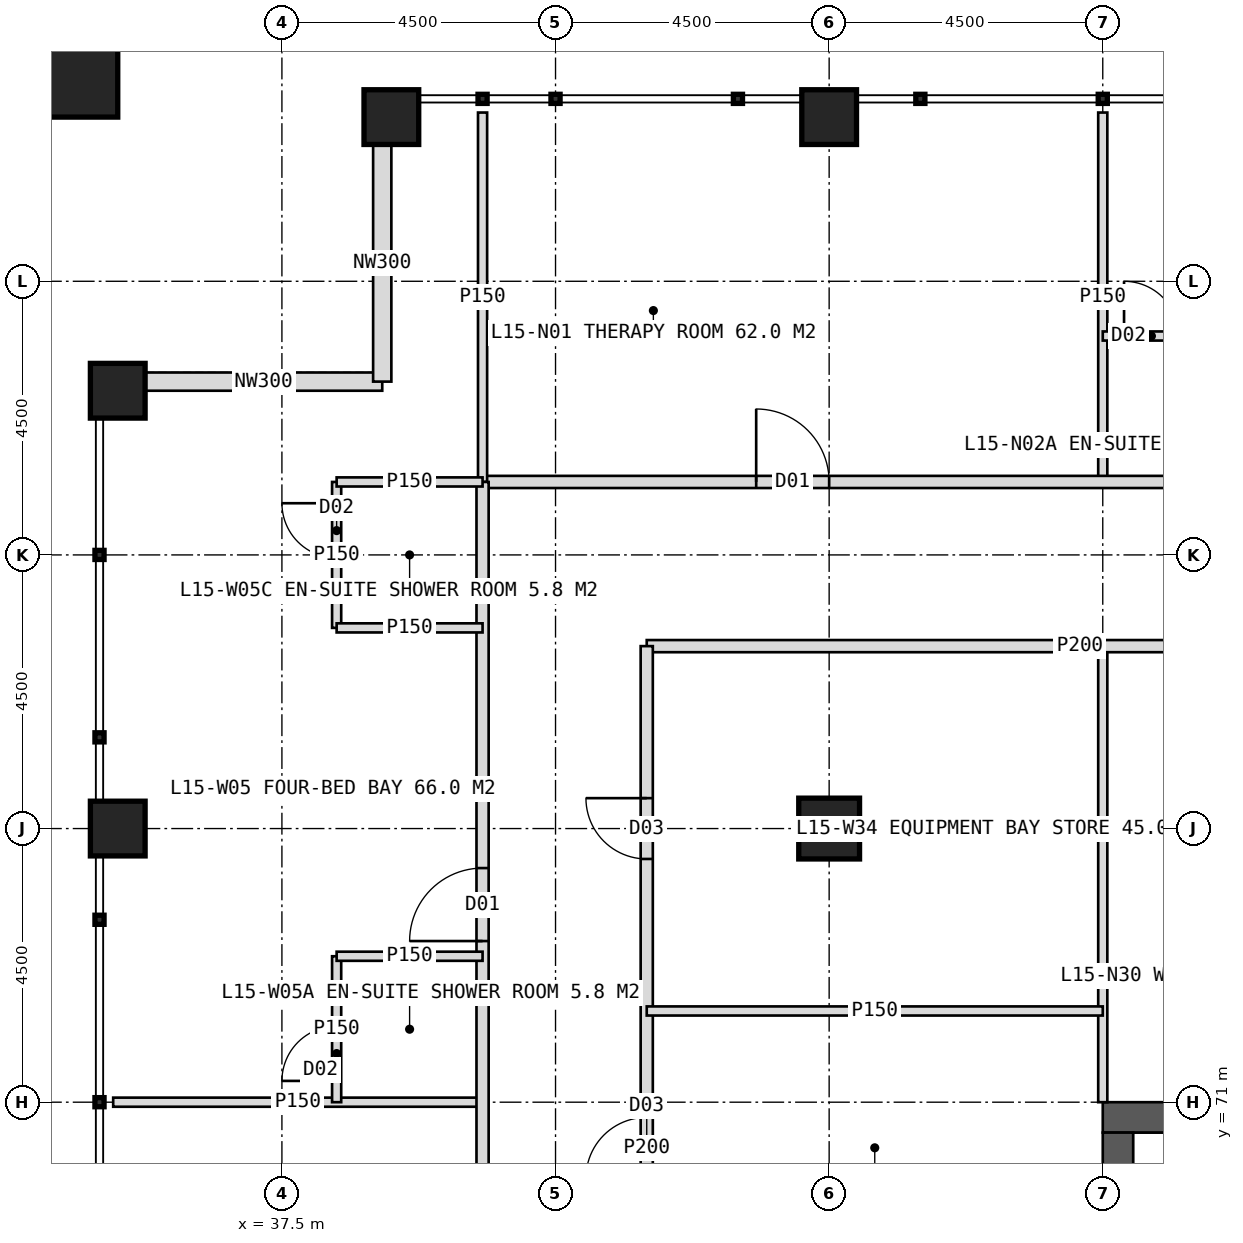
"""IFC4 building model, lengths in metres.
Left out: names, types, materials, properties, quantities, classifications, styles, units other than length and angle.
Written with IfcOpenShell. Run it as: python <this file> out.ifc"""

import sys

from ifc_helpers import new_model, si_unit, direction, frame, frame_2d, origin, origin_2d, place, context, subcontext, project, spatial, rectangle, hollow_rectangle, extrude, element, fill, save


model = new_model("IFC4")
c1 = context("Model", 3, precision=1e-05, world=origin(), true_north=direction((0.0, 1.0)))
c2 = subcontext(c1, "Body", "Model", "MODEL_VIEW")
j1 = project(units=[si_unit("LENGTHUNIT", "METRE"), si_unit("PLANEANGLEUNIT", "RADIAN")], contexts=[c1])
p1 = place(None, origin())
s1 = spatial("IfcSite", under=j1, at=p1, CompositionType="ELEMENT")
p2 = place(p1, origin())
s2 = spatial("IfcBuilding", under=s1, at=p2, CompositionType="ELEMENT")
p3 = place(p2, frame((0.0, 0.0, 67.0)))
s3 = spatial("IfcBuildingStorey", under=s2, at=p3, CompositionType="ELEMENT", Elevation=67.0)
p4 = place(p3, frame((51.0, 70.75, 0.0), z_axis=(0.0, 0.0, 1.0), x_axis=(1.0, 0.0, 0.0)))
e1 = element("IfcWall", 1, at=p4, inside=s3, PredefinedType="SHEAR", context=c2, shape_type="SweptSolid", body=[
    extrude(rectangle(XDim=18.0, YDim=0.5, at=frame_2d((9.0, 0.0))), origin(), (0.0, 0.0, 1.0), 4.0),
])
p5 = place(p4, frame((8.1, 0.0, 0.0)))
e2 = element("IfcOpeningElement", 2, at=p5, cuts=e1, PredefinedType="OPENING", context=c2, shape_type="SweptSolid", body=[
    extrude(rectangle(XDim=1.8, YDim=2.2, at=frame_2d((0.9, 1.1))), frame((0.0, 0.26, 0.0), z_axis=(0.0, -1.0, 0.0), x_axis=(1.0, 0.0, 0.0)), (0.0, 0.0, 1.0), 0.52),
])
p6 = place(p3, frame((51.25, 53.5, 0.0), z_axis=(0.0, 0.0, 1.0), x_axis=(0.0, 1.0, 0.0)))
e3 = element("IfcWall", 3, at=p6, inside=s3, PredefinedType="SHEAR", context=c2, shape_type="SweptSolid", body=[
    extrude(rectangle(XDim=17.0, YDim=0.5, at=frame_2d((8.5, 0.0))), origin(), (0.0, 0.0, 1.0), 4.0),
])
p7 = place(p6, frame((6.0, 0.0, 0.0)))
e4 = element("IfcOpeningElement", 4, at=p7, cuts=e3, PredefinedType="OPENING", context=c2, shape_type="SweptSolid", body=[
    extrude(rectangle(XDim=1.5, YDim=2.2, at=frame_2d((0.75, 1.1))), frame((0.0, 0.26, 0.0), z_axis=(0.0, -1.0, 0.0), x_axis=(1.0, 0.0, 0.0)), (0.0, 0.0, 1.0), 0.52),
])
p8 = place(p3, frame((46.5, 75.5, 0.0), z_axis=(0.0, 0.0, 1.0), x_axis=(1.0, 0.0, 0.0)))
e5 = element("IfcColumn", 5, at=p8, inside=s3, PredefinedType="COLUMN", context=c2, shape_type="SweptSolid", body=[
    extrude(hollow_rectangle(XDim=1.0, YDim=1.0, WallThickness=0.1, at=origin_2d()), origin(), (0.0, 0.0, 1.0), 4.0),
])
for number, where, z_axis, x_axis in (
    (6, (39.3, 87.2, 0.0), (0.0, 0.0, 1.0), (1.0, 0.0, 0.0)),
    (7, (46.5, 87.2, 0.0), (0.0, 0.0, 1.0), (1.0, 0.0, 0.0)),
    (8, (34.8, 75.5, 0.0), (0.0, 0.0, 1.0), (1.0, 0.0, 0.0)),
    (9, (34.8, 82.7, 0.0), (0.0, 0.0, 1.0), (1.0, 0.0, 0.0)),
):
    element("IfcColumn", number, at=place(p3, frame(where, z_axis=z_axis, x_axis=x_axis)), inside=s3, PredefinedType="COLUMN", context=c2, shape_type="SweptSolid", body=[
        extrude(hollow_rectangle(XDim=0.9, YDim=0.9, WallThickness=0.08, at=origin_2d()), origin(), (0.0, 0.0, 1.0), 4.0),
    ])
p9 = place(p3, frame((33.9, 88.1, 0.0), z_axis=(0.0, 0.0, 1.0), x_axis=(1.0, 0.0, 0.0)))
e10 = element("IfcColumn", 10, at=p9, inside=s3, PredefinedType="COLUMN", context=c2, shape_type="SweptSolid", body=[
    extrude(hollow_rectangle(XDim=1.8, YDim=1.8, WallThickness=0.1, at=origin_2d()), origin(), (0.0, 0.0, 1.0), 4.0),
])
for number, where, z_axis, x_axis in (
    (11, (35.25, 82.85, 0.0), (0.0, 0.0, 1.0), (1.0, 0.0, 0.0)),
    (12, (39.15, 82.85, 0.0), (0.0, 0.0, 1.0), (0.0, 1.0, 0.0)),
):
    element("IfcWall", number, at=place(p3, frame(where, z_axis=z_axis, x_axis=x_axis)), inside=s3, PredefinedType="ELEMENTEDWALL", context=c2, shape_type="SweptSolid", body=[
        extrude(rectangle(XDim=3.9, YDim=0.3, at=frame_2d((1.95, 0.0))), origin(), (0.0, 0.0, 1.0), 2.95),
    ])
p10 = place(p3, frame((51.0, 81.2, 0.0), z_axis=(0.0, 0.0, 1.0), x_axis=(0.0, 1.0, 0.0)))
e13 = element("IfcWall", 13, at=p10, inside=s3, PredefinedType="PARTITIONING", context=c2, shape_type="SweptSolid", body=[
    extrude(rectangle(XDim=6.075, YDim=0.15, at=frame_2d((3.038, 0.0))), origin(), (0.0, 0.0, 1.0), 3.75),
])
p11 = place(p3, frame((40.8, 81.2, 0.0), z_axis=(0.0, 0.0, 1.0), x_axis=(1.0, 0.0, 0.0)))
e14 = element("IfcWall", 14, at=p11, inside=s3, PredefinedType="PARTITIONING", context=c2, shape_type="SweptSolid", body=[
    extrude(rectangle(XDim=38.4, YDim=0.2, at=frame_2d((19.2, 0.0))), origin(), (0.0, 0.0, 1.0), 3.75),
])
p12 = place(p11, frame((4.5, 0.0, 0.0)))
e15 = element("IfcOpeningElement", 15, at=p12, cuts=e14, PredefinedType="OPENING", context=c2, shape_type="SweptSolid", body=[
    extrude(rectangle(XDim=1.2, YDim=2.2, at=frame_2d((0.6, 1.1))), frame((0.0, 0.11, 0.0), z_axis=(0.0, -1.0, 0.0), x_axis=(1.0, 0.0, 0.0)), (0.0, 0.0, 1.0), 0.22),
])
p13 = place(p11, frame((13.45, 0.0, 0.0)))
e16 = element("IfcOpeningElement", 16, at=p13, cuts=e14, PredefinedType="OPENING", context=c2, shape_type="SweptSolid", body=[
    extrude(rectangle(XDim=1.2, YDim=2.2, at=frame_2d((0.6, 1.1))), frame((0.0, 0.11, 0.0), z_axis=(0.0, -1.0, 0.0), x_axis=(1.0, 0.0, 0.0)), (0.0, 0.0, 1.0), 0.22),
])
p14 = place(p11, frame((22.45, 0.0, 0.0)))
e17 = element("IfcOpeningElement", 17, at=p14, cuts=e14, PredefinedType="OPENING", context=c2, shape_type="SweptSolid", body=[
    extrude(rectangle(XDim=1.2, YDim=2.2, at=frame_2d((0.6, 1.1))), frame((0.0, 0.11, 0.0), z_axis=(0.0, -1.0, 0.0), x_axis=(1.0, 0.0, 0.0)), (0.0, 0.0, 1.0), 0.22),
])
p15 = place(p11, frame((30.85, 0.0, 0.0)))
e18 = element("IfcOpeningElement", 18, at=p15, cuts=e14, PredefinedType="OPENING", context=c2, shape_type="SweptSolid", body=[
    extrude(rectangle(XDim=1.2, YDim=2.2, at=frame_2d((0.6, 1.1))), frame((0.0, 0.11, 0.0), z_axis=(0.0, -1.0, 0.0), x_axis=(1.0, 0.0, 0.0)), (0.0, 0.0, 1.0), 0.22),
])
p16 = place(p3, frame((40.8, 81.2, 0.0), z_axis=(0.0, 0.0, 1.0), x_axis=(0.0, 1.0, 0.0)))
e19 = element("IfcWall", 19, at=p16, inside=s3, PredefinedType="PARTITIONING", context=c2, shape_type="SweptSolid", body=[
    extrude(rectangle(XDim=6.075, YDim=0.15, at=frame_2d((3.038, 0.0))), origin(), (0.0, 0.0, 1.0), 3.75),
])
p17 = place(p3, frame((51.0, 83.6, 0.0), z_axis=(0.0, 0.0, 1.0), x_axis=(1.0, 0.0, 0.0)))
e20 = element("IfcWall", 20, at=p17, inside=s3, PredefinedType="PARTITIONING", context=c2, shape_type="SweptSolid", body=[
    extrude(rectangle(XDim=3.0, YDim=0.15, at=frame_2d((1.5, 0.0))), origin(), (0.0, 0.0, 1.0), 3.75),
])
p18 = place(p17, frame((0.35, 0.0, 0.0)))
e21 = element("IfcOpeningElement", 21, at=p18, cuts=e20, PredefinedType="OPENING", context=c2, shape_type="SweptSolid", body=[
    extrude(rectangle(XDim=0.9, YDim=2.1, at=frame_2d((0.45, 1.05))), frame((0.0, 0.085, 0.0), z_axis=(0.0, -1.0, 0.0), x_axis=(1.0, 0.0, 0.0)), (0.0, 0.0, 1.0), 0.17),
])
p19 = place(p3, frame((51.0, 71.0, 0.0), z_axis=(0.0, 0.0, 1.0), x_axis=(0.0, 1.0, 0.0)))
e22 = element("IfcWall", 22, at=p19, inside=s3, PredefinedType="PARTITIONING", context=c2, shape_type="SweptSolid", body=[
    extrude(rectangle(XDim=7.5, YDim=0.15, at=frame_2d((3.75, 0.0))), origin(), (0.0, 0.0, 1.0), 3.75),
])
p20 = place(p3, frame((43.5, 78.5, 0.0), z_axis=(0.0, 0.0, 1.0), x_axis=(1.0, 0.0, 0.0)))
e23 = element("IfcWall", 23, at=p20, inside=s3, PredefinedType="PARTITIONING", context=c2, shape_type="SweptSolid", body=[
    extrude(rectangle(XDim=14.25, YDim=0.2, at=frame_2d((7.125, 0.0))), origin(), (0.0, 0.0, 1.0), 3.75),
])
p21 = place(p20, frame((10.375, 0.0, 0.0)))
e24 = element("IfcOpeningElement", 24, at=p21, cuts=e23, PredefinedType="OPENING", context=c2, shape_type="SweptSolid", body=[
    extrude(rectangle(XDim=1.0, YDim=2.1, at=frame_2d((0.5, 1.05))), frame((0.0, 0.11, 0.0), z_axis=(0.0, -1.0, 0.0), x_axis=(1.0, 0.0, 0.0)), (0.0, 0.0, 1.0), 0.22),
])
p22 = place(p3, frame((40.8, 71.0, 0.0), z_axis=(0.0, 0.0, 1.0), x_axis=(-1.0, 0.0, 0.0)))
e25 = element("IfcWall", 25, at=p22, inside=s3, PredefinedType="PARTITIONING", context=c2, shape_type="SweptSolid", body=[
    extrude(rectangle(XDim=6.075, YDim=0.15, at=frame_2d((3.038, 0.0))), origin(), (0.0, 0.0, 1.0), 3.75),
])
p23 = place(p3, frame((40.8, 42.8, 0.0), z_axis=(0.0, 0.0, 1.0), x_axis=(0.0, 1.0, 0.0)))
e26 = element("IfcWall", 26, at=p23, inside=s3, PredefinedType="PARTITIONING", context=c2, shape_type="SweptSolid", body=[
    extrude(rectangle(XDim=38.4, YDim=0.2, at=frame_2d((19.2, 0.0))), origin(), (0.0, 0.0, 1.0), 3.75),
])
p24 = place(p23, frame((3.25, 0.0, 0.0)))
e27 = element("IfcOpeningElement", 27, at=p24, cuts=e26, PredefinedType="OPENING", context=c2, shape_type="SweptSolid", body=[
    extrude(rectangle(XDim=1.2, YDim=2.2, at=frame_2d((0.6, 1.1))), frame((0.0, 0.11, 0.0), z_axis=(0.0, -1.0, 0.0), x_axis=(1.0, 0.0, 0.0)), (0.0, 0.0, 1.0), 0.22),
])
p25 = place(p23, frame((9.85, 0.0, 0.0)))
e28 = element("IfcOpeningElement", 28, at=p25, cuts=e26, PredefinedType="OPENING", context=c2, shape_type="SweptSolid", body=[
    extrude(rectangle(XDim=1.2, YDim=2.2, at=frame_2d((0.6, 1.1))), frame((0.0, 0.11, 0.0), z_axis=(0.0, -1.0, 0.0), x_axis=(1.0, 0.0, 0.0)), (0.0, 0.0, 1.0), 0.22),
])
p26 = place(p23, frame((15.85, 0.0, 0.0)))
e29 = element("IfcOpeningElement", 29, at=p26, cuts=e26, PredefinedType="OPENING", context=c2, shape_type="SweptSolid", body=[
    extrude(rectangle(XDim=1.2, YDim=2.2, at=frame_2d((0.6, 1.1))), frame((0.0, 0.11, 0.0), z_axis=(0.0, -1.0, 0.0), x_axis=(1.0, 0.0, 0.0)), (0.0, 0.0, 1.0), 0.22),
])
p27 = place(p23, frame((22.45, 0.0, 0.0)))
e30 = element("IfcOpeningElement", 30, at=p27, cuts=e26, PredefinedType="OPENING", context=c2, shape_type="SweptSolid", body=[
    extrude(rectangle(XDim=1.2, YDim=2.2, at=frame_2d((0.6, 1.1))), frame((0.0, 0.11, 0.0), z_axis=(0.0, -1.0, 0.0), x_axis=(1.0, 0.0, 0.0)), (0.0, 0.0, 1.0), 0.22),
])
p28 = place(p23, frame((30.85, 0.0, 0.0)))
e31 = element("IfcOpeningElement", 31, at=p28, cuts=e26, PredefinedType="OPENING", context=c2, shape_type="SweptSolid", body=[
    extrude(rectangle(XDim=1.2, YDim=2.2, at=frame_2d((0.6, 1.1))), frame((0.0, 0.11, 0.0), z_axis=(0.0, -1.0, 0.0), x_axis=(1.0, 0.0, 0.0)), (0.0, 0.0, 1.0), 0.22),
])
p29 = place(p3, frame((38.4, 71.0, 0.0), z_axis=(0.0, 0.0, 1.0), x_axis=(0.0, 1.0, 0.0)))
e32 = element("IfcWall", 32, at=p29, inside=s3, PredefinedType="PARTITIONING", context=c2, shape_type="SweptSolid", body=[
    extrude(rectangle(XDim=2.4, YDim=0.15, at=frame_2d((1.2, 0.0))), origin(), (0.0, 0.0, 1.0), 3.75),
])
p30 = place(p29, frame((0.35, 0.0, 0.0)))
e33 = element("IfcOpeningElement", 33, at=p30, cuts=e32, PredefinedType="OPENING", context=c2, shape_type="SweptSolid", body=[
    extrude(rectangle(XDim=0.9, YDim=2.1, at=frame_2d((0.45, 1.05))), frame((0.0, 0.085, 0.0), z_axis=(0.0, -1.0, 0.0), x_axis=(1.0, 0.0, 0.0)), (0.0, 0.0, 1.0), 0.17),
])
p31 = place(p3, frame((40.8, 73.4, 0.0), z_axis=(0.0, 0.0, 1.0), x_axis=(-1.0, 0.0, 0.0)))
e34 = element("IfcWall", 34, at=p31, inside=s3, PredefinedType="PARTITIONING", context=c2, shape_type="SweptSolid", body=[
    extrude(rectangle(XDim=2.4, YDim=0.15, at=frame_2d((1.2, 0.0))), origin(), (0.0, 0.0, 1.0), 3.75),
])
p32 = place(p3, frame((38.4, 78.8, 0.0), z_axis=(0.0, 0.0, 1.0), x_axis=(0.0, 1.0, 0.0)))
e35 = element("IfcWall", 35, at=p32, inside=s3, PredefinedType="PARTITIONING", context=c2, shape_type="SweptSolid", body=[
    extrude(rectangle(XDim=2.4, YDim=0.15, at=frame_2d((1.2, 0.0))), origin(), (0.0, 0.0, 1.0), 3.75),
])
p33 = place(p32, frame((1.15, 0.0, 0.0)))
e36 = element("IfcOpeningElement", 36, at=p33, cuts=e35, PredefinedType="OPENING", context=c2, shape_type="SweptSolid", body=[
    extrude(rectangle(XDim=0.9, YDim=2.1, at=frame_2d((0.45, 1.05))), frame((0.0, 0.085, 0.0), z_axis=(0.0, -1.0, 0.0), x_axis=(1.0, 0.0, 0.0)), (0.0, 0.0, 1.0), 0.17),
])
for number, where, z_axis, x_axis in (
    (37, (40.8, 78.8, 0.0), (0.0, 0.0, 1.0), (-1.0, 0.0, 0.0)),
    (38, (40.8, 81.2, 0.0), (0.0, 0.0, 1.0), (-1.0, 0.0, 0.0)),
):
    element("IfcWall", number, at=place(p3, frame(where, z_axis=z_axis, x_axis=x_axis)), inside=s3, PredefinedType="PARTITIONING", context=c2, shape_type="SweptSolid", body=[
        extrude(rectangle(XDim=2.4, YDim=0.15, at=frame_2d((1.2, 0.0))), origin(), (0.0, 0.0, 1.0), 3.75),
    ])
p34 = place(p3, frame((43.5, 62.0, 0.0), z_axis=(0.0, 0.0, 1.0), x_axis=(0.0, 1.0, 0.0)))
e39 = element("IfcWall", 39, at=p34, inside=s3, PredefinedType="PARTITIONING", context=c2, shape_type="SweptSolid", body=[
    extrude(rectangle(XDim=16.5, YDim=0.2, at=frame_2d((8.25, 0.0))), origin(), (0.0, 0.0, 1.0), 3.75),
])
p35 = place(p34, frame((2.5, 0.0, 0.0)))
e40 = element("IfcOpeningElement", 40, at=p35, cuts=e39, PredefinedType="OPENING", context=c2, shape_type="SweptSolid", body=[
    extrude(rectangle(XDim=1.0, YDim=2.1, at=frame_2d((0.5, 1.05))), frame((0.0, 0.11, 0.0), z_axis=(0.0, -1.0, 0.0), x_axis=(1.0, 0.0, 0.0)), (0.0, 0.0, 1.0), 0.22),
])
p36 = place(p34, frame((7.75, 0.0, 0.0)))
e41 = element("IfcOpeningElement", 41, at=p36, cuts=e39, PredefinedType="OPENING", context=c2, shape_type="SweptSolid", body=[
    extrude(rectangle(XDim=1.0, YDim=2.1, at=frame_2d((0.5, 1.05))), frame((0.0, 0.11, 0.0), z_axis=(0.0, -1.0, 0.0), x_axis=(1.0, 0.0, 0.0)), (0.0, 0.0, 1.0), 0.22),
])
p37 = place(p34, frame((13.0, 0.0, 0.0)))
e42 = element("IfcOpeningElement", 42, at=p37, cuts=e39, PredefinedType="OPENING", context=c2, shape_type="SweptSolid", body=[
    extrude(rectangle(XDim=1.0, YDim=2.1, at=frame_2d((0.5, 1.05))), frame((0.0, 0.11, 0.0), z_axis=(0.0, -1.0, 0.0), x_axis=(1.0, 0.0, 0.0)), (0.0, 0.0, 1.0), 0.22),
])
p38 = place(p3, frame((51.0, 72.5, 0.0), z_axis=(0.0, 0.0, 1.0), x_axis=(-1.0, 0.0, 0.0)))
e43 = element("IfcWall", 43, at=p38, inside=s3, PredefinedType="PARTITIONING", context=c2, shape_type="SweptSolid", body=[
    extrude(rectangle(XDim=7.5, YDim=0.15, at=frame_2d((3.75, 0.0))), origin(), (0.0, 0.0, 1.0), 3.75),
])
p39 = place(p12, origin())
e44 = element("IfcDoor", 44, at=p39, inside=s3, OperationType="SINGLE_SWING_LEFT", PredefinedType="DOOR", context=c2, shape_type="SweptSolid", body=[
    extrude(rectangle(XDim=1.2, YDim=2.2, at=frame_2d((0.6, 1.1))), frame((0.0, 0.025, 0.0), z_axis=(0.0, -1.0, 0.0), x_axis=(1.0, 0.0, 0.0)), (0.0, 0.0, 1.0), 0.05),
])
fill(e15, e44)
p40 = place(p18, origin())
e45 = element("IfcDoor", 45, at=p40, inside=s3, OperationType="SINGLE_SWING_LEFT", PredefinedType="DOOR", context=c2, shape_type="SweptSolid", body=[
    extrude(rectangle(XDim=0.9, YDim=2.1, at=frame_2d((0.45, 1.05))), frame((0.0, 0.025, 0.0), z_axis=(0.0, -1.0, 0.0), x_axis=(1.0, 0.0, 0.0)), (0.0, 0.0, 1.0), 0.05),
])
fill(e21, e45)
p41 = place(p28, origin())
e46 = element("IfcDoor", 46, at=p41, inside=s3, OperationType="SINGLE_SWING_LEFT", PredefinedType="DOOR", context=c2, shape_type="SweptSolid", body=[
    extrude(rectangle(XDim=1.2, YDim=2.2, at=frame_2d((0.6, 1.1))), frame((0.0, 0.025, 0.0), z_axis=(0.0, -1.0, 0.0), x_axis=(1.0, 0.0, 0.0)), (0.0, 0.0, 1.0), 0.05),
])
fill(e31, e46)
p42 = place(p30, origin())
e47 = element("IfcDoor", 47, at=p42, inside=s3, OperationType="SINGLE_SWING_LEFT", PredefinedType="DOOR", context=c2, shape_type="SweptSolid", body=[
    extrude(rectangle(XDim=0.9, YDim=2.1, at=frame_2d((0.45, 1.05))), frame((0.0, 0.025, 0.0), z_axis=(0.0, -1.0, 0.0), x_axis=(1.0, 0.0, 0.0)), (0.0, 0.0, 1.0), 0.05),
])
fill(e33, e47)
p43 = place(p33, origin())
e48 = element("IfcDoor", 48, at=p43, inside=s3, OperationType="SINGLE_SWING_RIGHT", PredefinedType="DOOR", context=c2, shape_type="SweptSolid", body=[
    extrude(rectangle(XDim=0.9, YDim=2.1, at=frame_2d((0.45, 1.05))), frame((0.0, 0.025, 0.0), z_axis=(0.0, -1.0, 0.0), x_axis=(1.0, 0.0, 0.0)), (0.0, 0.0, 1.0), 0.05),
])
fill(e36, e48)
p44 = place(p36, origin())
e49 = element("IfcDoor", 49, at=p44, inside=s3, OperationType="SINGLE_SWING_LEFT", PredefinedType="DOOR", context=c2, shape_type="SweptSolid", body=[
    extrude(rectangle(XDim=1.0, YDim=2.1, at=frame_2d((0.5, 1.05))), frame((0.0, 0.025, 0.0), z_axis=(0.0, -1.0, 0.0), x_axis=(1.0, 0.0, 0.0)), (0.0, 0.0, 1.0), 0.05),
])
fill(e41, e49)
p45 = place(p37, origin())
e50 = element("IfcDoor", 50, at=p45, inside=s3, OperationType="SINGLE_SWING_RIGHT", PredefinedType="DOOR", context=c2, shape_type="SweptSolid", body=[
    extrude(rectangle(XDim=1.0, YDim=2.1, at=frame_2d((0.5, 1.05))), frame((0.0, 0.025, 0.0), z_axis=(0.0, -1.0, 0.0), x_axis=(1.0, 0.0, 0.0)), (0.0, 0.0, 1.0), 0.05),
])
fill(e42, e50)
save(model, sys.argv[1])
